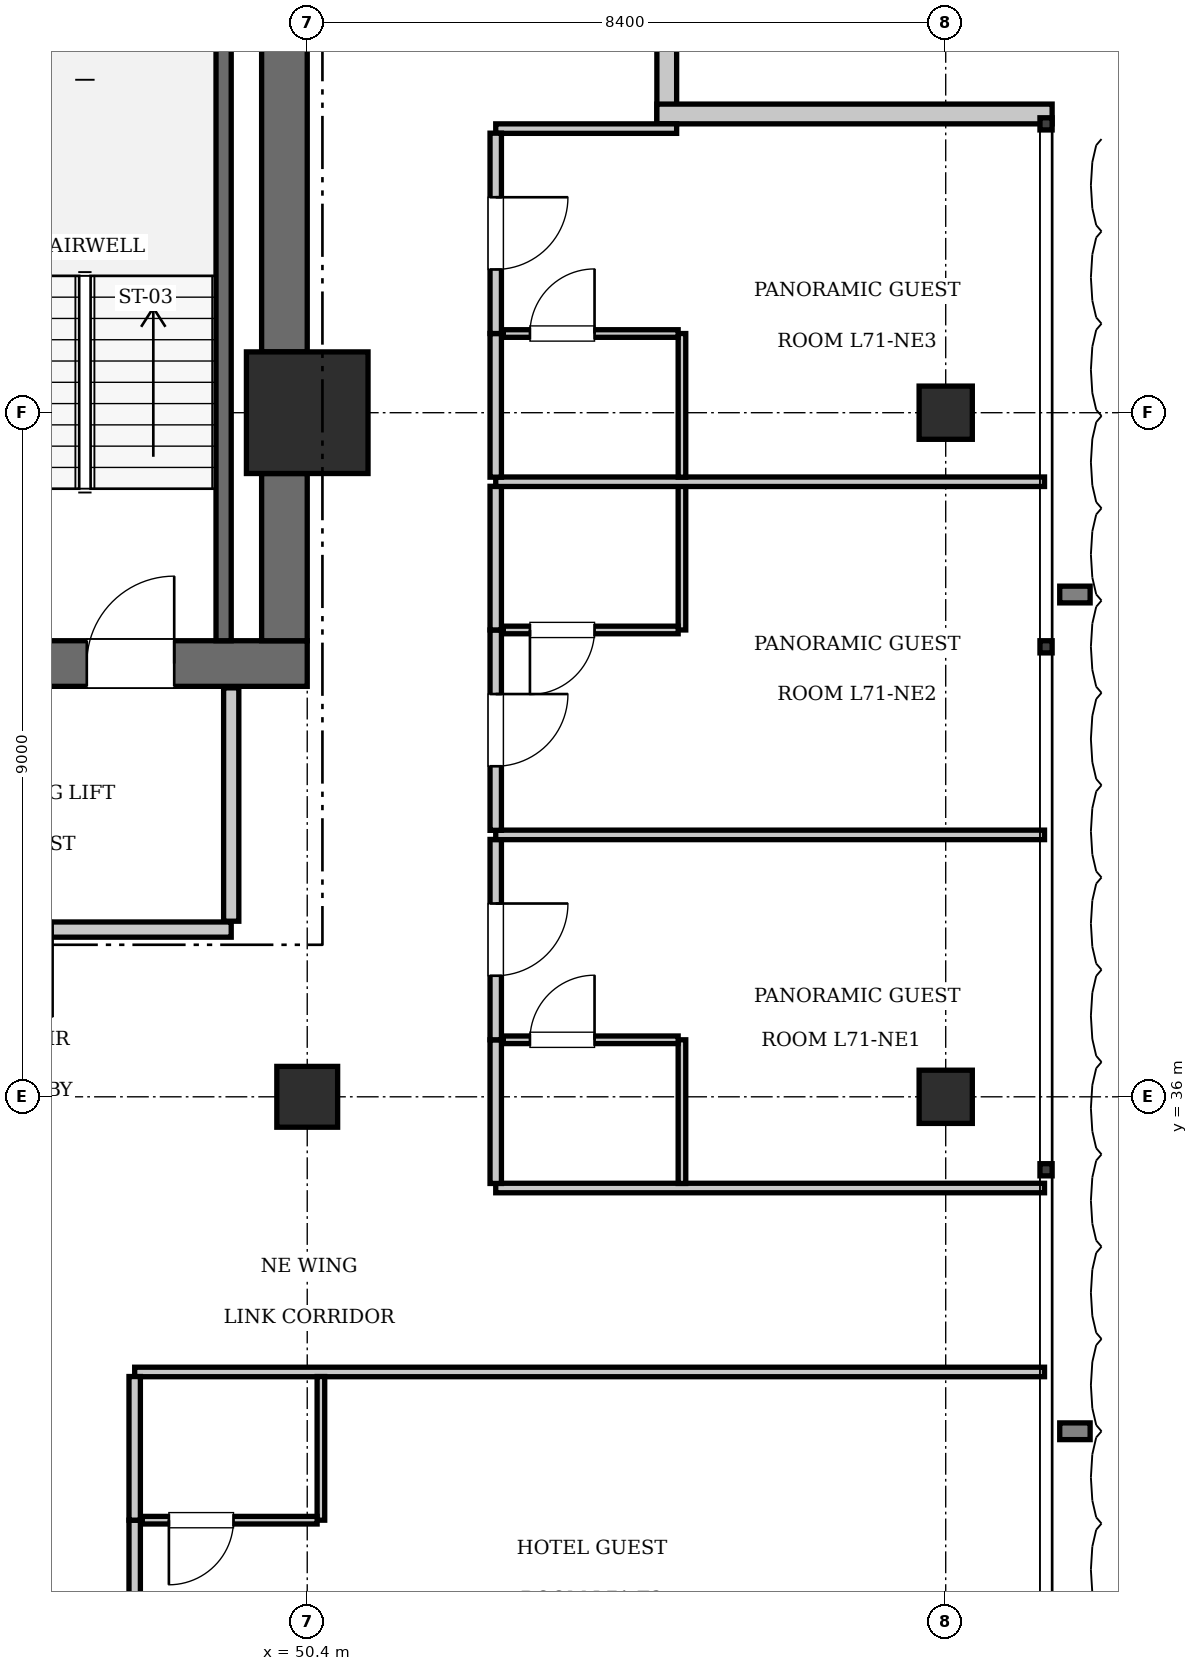
"""IFC4 building model, lengths in metres.
Left out: names, types, materials, properties, quantities, classifications, styles, units other than length and angle.
Written with IfcOpenShell. Run it as: python <this file> out.ifc"""

import sys

from ifc_helpers import new_model, si_unit, direction, frame, frame_2d, origin, origin_2d, place, context, subcontext, project, spatial, rectangle, extrude, element, fill, save


model = new_model("IFC4")
c1 = context("Model", 3, precision=1e-05, world=origin(), true_north=direction((0.0, 1.0)))
c2 = subcontext(c1, "Body", "Model", "MODEL_VIEW")
j1 = project(units=[si_unit("LENGTHUNIT", "METRE"), si_unit("PLANEANGLEUNIT", "RADIAN")], contexts=[c1])
p1 = place(None, origin())
s1 = spatial("IfcSite", under=j1, at=p1, CompositionType="ELEMENT")
p2 = place(p1, origin())
s2 = spatial("IfcBuilding", under=s1, at=p2, CompositionType="ELEMENT")
p3 = place(p2, frame((0.0, 0.0, 289.45)))
s3 = spatial("IfcBuildingStorey", under=s2, at=p3, CompositionType="ELEMENT", Elevation=289.45)
p4 = place(p3, frame((50.4, 45.0, 0.0), z_axis=(0.0, 0.0, 1.0), x_axis=(1.0, 0.0, 0.0)))
e1 = element("IfcColumn", 1, at=p4, inside=s3, PredefinedType="COLUMN", context=c2, shape_type="SweptSolid", body=[
    extrude(rectangle(XDim=1.6, YDim=1.6, at=origin_2d()), origin(), (0.0, 0.0, 1.0), 3.85),
])
p5 = place(p3, frame((43.6, 41.7, 0.0), z_axis=(0.0, 0.0, 1.0), x_axis=(1.0, 0.0, 0.0)))
e2 = element("IfcWall", 2, at=p5, inside=s3, PredefinedType="SHEAR", context=c2, shape_type="SweptSolid", body=[
    extrude(rectangle(XDim=6.8, YDim=0.6, at=frame_2d((3.4, 0.0))), origin(), (0.0, 0.0, 1.0), 3.85),
])
p6 = place(p5, frame((3.9, 0.0, 0.0)))
e3 = element("IfcOpeningElement", 3, at=p6, cuts=e2, PredefinedType="OPENING", context=c2, shape_type="SweptSolid", body=[
    extrude(rectangle(XDim=1.15, YDim=2.15, at=frame_2d((0.575, 1.075))), frame((0.0, 0.31, 0.0), z_axis=(0.0, -1.0, 0.0), x_axis=(1.0, 0.0, 0.0)), (0.0, 0.0, 1.0), 0.62),
])
p7 = place(p5, frame((0.55, 0.0, 0.0)))
e4 = element("IfcOpeningElement", 4, at=p7, cuts=e2, PredefinedType="OPENING", context=c2, shape_type="SweptSolid", body=[
    extrude(rectangle(XDim=1.1, YDim=2.2, at=frame_2d((0.55, 1.1))), frame((0.0, 0.31, 0.0), z_axis=(0.0, -1.0, 0.0), x_axis=(1.0, 0.0, 0.0)), (0.0, 0.0, 1.0), 0.62),
])
p8 = place(p3, frame((50.1, 42.0, 0.0), z_axis=(0.0, 0.0, 1.0), x_axis=(0.0, 1.0, 0.0)))
e5 = element("IfcWall", 5, at=p8, inside=s3, PredefinedType="SHEAR", context=c2, shape_type="SweptSolid", body=[
    extrude(rectangle(XDim=2.2, YDim=0.6, at=frame_2d((1.1, 0.0))), origin(), (0.0, 0.0, 1.0), 3.85),
])
p9 = place(p3, frame((50.1, 45.8, 0.0), z_axis=(0.0, 0.0, 1.0), x_axis=(0.0, 1.0, 0.0)))
e6 = element("IfcWall", 6, at=p9, inside=s3, PredefinedType="SHEAR", context=c2, shape_type="SweptSolid", body=[
    extrude(rectangle(XDim=7.6, YDim=0.6, at=frame_2d((3.8, 0.0))), origin(), (0.0, 0.0, 1.0), 3.85),
])
p10 = place(p3, frame((50.4, 36.0, 0.0), z_axis=(0.0, 0.0, 1.0), x_axis=(1.0, 0.0, 0.0)))
e7 = element("IfcColumn", 7, at=p10, inside=s3, PredefinedType="COLUMN", context=c2, shape_type="SweptSolid", body=[
    extrude(rectangle(XDim=0.8, YDim=0.8, at=origin_2d()), origin(), (0.0, 0.0, 1.0), 3.85),
])
for number, where, z_axis, x_axis in (
    (8, (58.8, 36.0, 0.0), (0.0, 0.0, 1.0), (1.0, 0.0, 0.0)),
    (9, (58.8, 45.0, 0.0), (0.0, 0.0, 1.0), (1.0, 0.0, 0.0)),
):
    element("IfcColumn", number, at=place(p3, frame(where, z_axis=z_axis, x_axis=x_axis)), inside=s3, PredefinedType="COLUMN", context=c2, shape_type="SweptSolid", body=[
        extrude(rectangle(XDim=0.7, YDim=0.7, at=origin_2d()), origin(), (0.0, 0.0, 1.0), 3.85),
    ])
p11 = place(p3, frame((49.3, 42.0, 0.0), z_axis=(0.0, 0.0, 1.0), x_axis=(0.0, 1.0, 0.0)))
e10 = element("IfcWall", 10, at=p11, inside=s3, PredefinedType="SOLIDWALL", context=c2, shape_type="SweptSolid", body=[
    extrude(rectangle(XDim=9.12, YDim=0.2, at=frame_2d((4.56, 0.0))), origin(), (0.0, 0.0, 1.0), 3.61),
])
for number, where, z_axis, x_axis in (
    (11, (55.13, 54.0, 0.0), (0.0, 0.0, 1.0), (0.0, -1.0, 0.0)),
    (12, (55.0, 48.93, 0.0), (0.0, 0.0, 1.0), (1.0, 0.0, 0.0)),
):
    element("IfcWall", number, at=place(p3, frame(where, z_axis=z_axis, x_axis=x_axis)), inside=s3, PredefinedType="SOLIDWALL", context=c2, shape_type="SweptSolid", body=[
        extrude(rectangle(XDim=5.2, YDim=0.26, at=frame_2d((2.6, 0.0))), origin(), (0.0, 0.0, 1.0), 3.61),
    ])
p12 = place(p3, frame((43.6, 38.2, 0.0), z_axis=(0.0, 0.0, 1.0), x_axis=(1.0, 0.0, 0.0)))
e13 = element("IfcWall", 13, at=p12, inside=s3, PredefinedType="PARTITIONING", context=c2, shape_type="SweptSolid", body=[
    extrude(rectangle(XDim=5.8, YDim=0.2, at=frame_2d((2.9, 0.0))), origin(), (0.0, 0.0, 1.0), 3.61),
])
p13 = place(p12, frame((2.3, 0.0, 0.0)))
e14 = element("IfcOpeningElement", 14, at=p13, cuts=e13, PredefinedType="OPENING", context=c2, shape_type="SweptSolid", body=[
    extrude(rectangle(XDim=1.15, YDim=2.15, at=frame_2d((0.575, 1.075))), frame((0.0, 0.11, 0.0), z_axis=(0.0, -1.0, 0.0), x_axis=(1.0, 0.0, 0.0)), (0.0, 0.0, 1.0), 0.22),
])
p14 = place(p3, frame((49.4, 38.31, 0.0), z_axis=(0.0, 0.0, 1.0), x_axis=(0.0, 1.0, 0.0)))
e15 = element("IfcWall", 15, at=p14, inside=s3, PredefinedType="PARTITIONING", context=c2, shape_type="SweptSolid", body=[
    extrude(rectangle(XDim=3.07, YDim=0.2, at=frame_2d((1.535, 0.0))), origin(), (0.0, 0.0, 1.0), 3.61),
])
p15 = place(p3, frame((48.13, 32.38, 0.0), z_axis=(0.0, 0.0, 1.0), x_axis=(1.0, 0.0, 0.0)))
e16 = element("IfcWall", 16, at=p15, inside=s3, PredefinedType="PARTITIONING", context=c2, shape_type="SweptSolid", body=[
    extrude(rectangle(XDim=11.97, YDim=0.125, at=frame_2d((5.985, 0.0))), origin(), (0.0, 0.0, 1.0), 3.61),
])
p16 = place(p3, frame((48.13, 27.4, 0.0), z_axis=(0.0, 0.0, 1.0), x_axis=(0.0, 1.0, 0.0)))
e17 = element("IfcWall", 17, at=p16, inside=s3, PredefinedType="PARTITIONING", context=c2, shape_type="SweptSolid", body=[
    extrude(rectangle(XDim=3.03, YDim=0.15, at=frame_2d((1.515, 0.0))), origin(), (0.0, 0.0, 1.0), 3.61),
])
p17 = place(p16, frame((1.04, 0.0, 0.0)))
e18 = element("IfcOpeningElement", 18, at=p17, cuts=e17, PredefinedType="OPENING", context=c2, shape_type="SweptSolid", body=[
    extrude(rectangle(XDim=0.95, YDim=2.15, at=frame_2d((0.475, 1.075))), frame((0.0, 0.085, 0.0), z_axis=(0.0, -1.0, 0.0), x_axis=(1.0, 0.0, 0.0)), (0.0, 0.0, 1.0), 0.17),
])
p18 = place(p3, frame((48.13, 30.43, 0.0), z_axis=(0.0, 0.0, 1.0), x_axis=(0.0, 1.0, 0.0)))
e19 = element("IfcWall", 19, at=p18, inside=s3, PredefinedType="PARTITIONING", context=c2, shape_type="SweptSolid", body=[
    extrude(rectangle(XDim=1.89, YDim=0.15, at=frame_2d((0.945, 0.0))), origin(), (0.0, 0.0, 1.0), 3.61),
])
p19 = place(p3, frame((50.58, 30.43, 0.0), z_axis=(0.0, 0.0, 1.0), x_axis=(0.0, 1.0, 0.0)))
e20 = element("IfcWall", 20, at=p19, inside=s3, PredefinedType="PARTITIONING", context=c2, shape_type="SweptSolid", body=[
    extrude(rectangle(XDim=1.89, YDim=0.1, at=frame_2d((0.945, 0.0))), origin(), (0.0, 0.0, 1.0), 3.61),
])
p20 = place(p3, frame((48.23, 30.43, 0.0), z_axis=(0.0, 0.0, 1.0), x_axis=(1.0, 0.0, 0.0)))
e21 = element("IfcWall", 21, at=p20, inside=s3, PredefinedType="PARTITIONING", context=c2, shape_type="SweptSolid", body=[
    extrude(rectangle(XDim=2.3, YDim=0.1, at=frame_2d((1.15, 0.0))), origin(), (0.0, 0.0, 1.0), 3.61),
])
p21 = place(p20, frame((0.35, 0.0, 0.0)))
e22 = element("IfcOpeningElement", 22, at=p21, cuts=e21, PredefinedType="OPENING", context=c2, shape_type="SweptSolid", body=[
    extrude(rectangle(XDim=0.85, YDim=2.1, at=frame_2d((0.425, 1.05))), frame((0.0, 0.06, 0.0), z_axis=(0.0, -1.0, 0.0), x_axis=(1.0, 0.0, 0.0)), (0.0, 0.0, 1.0), 0.12),
])
p22 = place(p3, frame((52.88, 34.8, 0.0), z_axis=(0.0, 0.0, 1.0), x_axis=(1.0, 0.0, 0.0)))
e23 = element("IfcWall", 23, at=p22, inside=s3, PredefinedType="PARTITIONING", context=c2, shape_type="SweptSolid", body=[
    extrude(rectangle(XDim=7.22, YDim=0.125, at=frame_2d((3.61, 0.0))), origin(), (0.0, 0.0, 1.0), 3.61),
])
p23 = place(p3, frame((52.88, 48.738, 0.0), z_axis=(0.0, 0.0, 1.0), x_axis=(1.0, 0.0, 0.0)))
e24 = element("IfcWall", 24, at=p23, inside=s3, PredefinedType="PARTITIONING", context=c2, shape_type="SweptSolid", body=[
    extrude(rectangle(XDim=2.38, YDim=0.125, at=frame_2d((1.19, 0.0))), origin(), (0.0, 0.0, 1.0), 3.61),
])
p24 = place(p3, frame((52.88, 34.86, 0.0), z_axis=(0.0, 0.0, 1.0), x_axis=(0.0, 1.0, 0.0)))
e25 = element("IfcWall", 25, at=p24, inside=s3, PredefinedType="PARTITIONING", context=c2, shape_type="SweptSolid", body=[
    extrude(rectangle(XDim=1.89, YDim=0.15, at=frame_2d((0.945, 0.0))), origin(), (0.0, 0.0, 1.0), 3.61),
])
p25 = place(p3, frame((52.88, 36.75, 0.0), z_axis=(0.0, 0.0, 1.0), x_axis=(0.0, 1.0, 0.0)))
e26 = element("IfcWall", 26, at=p25, inside=s3, PredefinedType="PARTITIONING", context=c2, shape_type="SweptSolid", body=[
    extrude(rectangle(XDim=2.636, YDim=0.15, at=frame_2d((1.318, 0.0))), origin(), (0.0, 0.0, 1.0), 3.61),
])
p26 = place(p25, frame((0.843, 0.0, 0.0)))
e27 = element("IfcOpeningElement", 27, at=p26, cuts=e26, PredefinedType="OPENING", context=c2, shape_type="SweptSolid", body=[
    extrude(rectangle(XDim=0.95, YDim=2.15, at=frame_2d((0.475, 1.075))), frame((0.0, 0.085, 0.0), z_axis=(0.0, -1.0, 0.0), x_axis=(1.0, 0.0, 0.0)), (0.0, 0.0, 1.0), 0.17),
])
p27 = place(p3, frame((55.33, 34.86, 0.0), z_axis=(0.0, 0.0, 1.0), x_axis=(0.0, 1.0, 0.0)))
e28 = element("IfcWall", 28, at=p27, inside=s3, PredefinedType="PARTITIONING", context=c2, shape_type="SweptSolid", body=[
    extrude(rectangle(XDim=1.89, YDim=0.1, at=frame_2d((0.945, 0.0))), origin(), (0.0, 0.0, 1.0), 3.61),
])
p28 = place(p3, frame((52.98, 36.75, 0.0), z_axis=(0.0, 0.0, 1.0), x_axis=(1.0, 0.0, 0.0)))
e29 = element("IfcWall", 29, at=p28, inside=s3, PredefinedType="PARTITIONING", context=c2, shape_type="SweptSolid", body=[
    extrude(rectangle(XDim=2.3, YDim=0.1, at=frame_2d((1.15, 0.0))), origin(), (0.0, 0.0, 1.0), 3.61),
])
p29 = place(p28, frame((0.35, 0.0, 0.0)))
e30 = element("IfcOpeningElement", 30, at=p29, cuts=e29, PredefinedType="OPENING", context=c2, shape_type="SweptSolid", body=[
    extrude(rectangle(XDim=0.85, YDim=2.1, at=frame_2d((0.425, 1.05))), frame((0.0, 0.06, 0.0), z_axis=(0.0, -1.0, 0.0), x_axis=(1.0, 0.0, 0.0)), (0.0, 0.0, 1.0), 0.12),
])
p30 = place(p3, frame((52.88, 39.446, 0.0), z_axis=(0.0, 0.0, 1.0), x_axis=(1.0, 0.0, 0.0)))
e31 = element("IfcWall", 31, at=p30, inside=s3, PredefinedType="PARTITIONING", context=c2, shape_type="SweptSolid", body=[
    extrude(rectangle(XDim=7.22, YDim=0.125, at=frame_2d((3.61, 0.0))), origin(), (0.0, 0.0, 1.0), 3.61),
])
p31 = place(p3, frame((52.88, 39.506, 0.0), z_axis=(0.0, 0.0, 1.0), x_axis=(0.0, 1.0, 0.0)))
e32 = element("IfcWall", 32, at=p31, inside=s3, PredefinedType="PARTITIONING", context=c2, shape_type="SweptSolid", body=[
    extrude(rectangle(XDim=2.636, YDim=0.15, at=frame_2d((1.318, 0.0))), origin(), (0.0, 0.0, 1.0), 3.61),
])
p32 = place(p31, frame((0.843, 0.0, 0.0)))
e33 = element("IfcOpeningElement", 33, at=p32, cuts=e32, PredefinedType="OPENING", context=c2, shape_type="SweptSolid", body=[
    extrude(rectangle(XDim=0.95, YDim=2.15, at=frame_2d((0.475, 1.075))), frame((0.0, 0.085, 0.0), z_axis=(0.0, -1.0, 0.0), x_axis=(1.0, 0.0, 0.0)), (0.0, 0.0, 1.0), 0.17),
])
p33 = place(p3, frame((52.88, 42.142, 0.0), z_axis=(0.0, 0.0, 1.0), x_axis=(0.0, 1.0, 0.0)))
e34 = element("IfcWall", 34, at=p33, inside=s3, PredefinedType="PARTITIONING", context=c2, shape_type="SweptSolid", body=[
    extrude(rectangle(XDim=1.89, YDim=0.15, at=frame_2d((0.945, 0.0))), origin(), (0.0, 0.0, 1.0), 3.61),
])
p34 = place(p3, frame((55.33, 42.142, 0.0), z_axis=(0.0, 0.0, 1.0), x_axis=(0.0, 1.0, 0.0)))
e35 = element("IfcWall", 35, at=p34, inside=s3, PredefinedType="PARTITIONING", context=c2, shape_type="SweptSolid", body=[
    extrude(rectangle(XDim=1.89, YDim=0.1, at=frame_2d((0.945, 0.0))), origin(), (0.0, 0.0, 1.0), 3.61),
])
p35 = place(p3, frame((52.98, 42.142, 0.0), z_axis=(0.0, 0.0, 1.0), x_axis=(1.0, 0.0, 0.0)))
e36 = element("IfcWall", 36, at=p35, inside=s3, PredefinedType="PARTITIONING", context=c2, shape_type="SweptSolid", body=[
    extrude(rectangle(XDim=2.3, YDim=0.1, at=frame_2d((1.15, 0.0))), origin(), (0.0, 0.0, 1.0), 3.61),
])
p36 = place(p35, frame((0.35, 0.0, 0.0)))
e37 = element("IfcOpeningElement", 37, at=p36, cuts=e36, PredefinedType="OPENING", context=c2, shape_type="SweptSolid", body=[
    extrude(rectangle(XDim=0.85, YDim=2.1, at=frame_2d((0.425, 1.05))), frame((0.0, 0.06, 0.0), z_axis=(0.0, -1.0, 0.0), x_axis=(1.0, 0.0, 0.0)), (0.0, 0.0, 1.0), 0.12),
])
p37 = place(p3, frame((52.88, 44.092, 0.0), z_axis=(0.0, 0.0, 1.0), x_axis=(1.0, 0.0, 0.0)))
e38 = element("IfcWall", 38, at=p37, inside=s3, PredefinedType="PARTITIONING", context=c2, shape_type="SweptSolid", body=[
    extrude(rectangle(XDim=7.22, YDim=0.125, at=frame_2d((3.61, 0.0))), origin(), (0.0, 0.0, 1.0), 3.61),
])
p38 = place(p3, frame((52.88, 44.152, 0.0), z_axis=(0.0, 0.0, 1.0), x_axis=(0.0, 1.0, 0.0)))
e39 = element("IfcWall", 39, at=p38, inside=s3, PredefinedType="PARTITIONING", context=c2, shape_type="SweptSolid", body=[
    extrude(rectangle(XDim=1.89, YDim=0.15, at=frame_2d((0.945, 0.0))), origin(), (0.0, 0.0, 1.0), 3.61),
])
p39 = place(p3, frame((52.88, 46.042, 0.0), z_axis=(0.0, 0.0, 1.0), x_axis=(0.0, 1.0, 0.0)))
e40 = element("IfcWall", 40, at=p39, inside=s3, PredefinedType="PARTITIONING", context=c2, shape_type="SweptSolid", body=[
    extrude(rectangle(XDim=2.636, YDim=0.15, at=frame_2d((1.318, 0.0))), origin(), (0.0, 0.0, 1.0), 3.61),
])
p40 = place(p39, frame((0.843, 0.0, 0.0)))
e41 = element("IfcOpeningElement", 41, at=p40, cuts=e40, PredefinedType="OPENING", context=c2, shape_type="SweptSolid", body=[
    extrude(rectangle(XDim=0.95, YDim=2.15, at=frame_2d((0.475, 1.075))), frame((0.0, 0.085, 0.0), z_axis=(0.0, -1.0, 0.0), x_axis=(1.0, 0.0, 0.0)), (0.0, 0.0, 1.0), 0.17),
])
p41 = place(p3, frame((55.33, 44.152, 0.0), z_axis=(0.0, 0.0, 1.0), x_axis=(0.0, 1.0, 0.0)))
e42 = element("IfcWall", 42, at=p41, inside=s3, PredefinedType="PARTITIONING", context=c2, shape_type="SweptSolid", body=[
    extrude(rectangle(XDim=1.89, YDim=0.1, at=frame_2d((0.945, 0.0))), origin(), (0.0, 0.0, 1.0), 3.61),
])
p42 = place(p3, frame((52.98, 46.042, 0.0), z_axis=(0.0, 0.0, 1.0), x_axis=(1.0, 0.0, 0.0)))
e43 = element("IfcWall", 43, at=p42, inside=s3, PredefinedType="PARTITIONING", context=c2, shape_type="SweptSolid", body=[
    extrude(rectangle(XDim=2.3, YDim=0.1, at=frame_2d((1.15, 0.0))), origin(), (0.0, 0.0, 1.0), 3.61),
])
p43 = place(p42, frame((0.35, 0.0, 0.0)))
e44 = element("IfcOpeningElement", 44, at=p43, cuts=e43, PredefinedType="OPENING", context=c2, shape_type="SweptSolid", body=[
    extrude(rectangle(XDim=0.85, YDim=2.1, at=frame_2d((0.425, 1.05))), frame((0.0, 0.06, 0.0), z_axis=(0.0, -1.0, 0.0), x_axis=(1.0, 0.0, 0.0)), (0.0, 0.0, 1.0), 0.12),
])
p44 = place(p6, origin())
e45 = element("IfcDoor", 45, at=p44, inside=s3, OperationType="SINGLE_SWING_RIGHT", PredefinedType="DOOR", context=c2, shape_type="SweptSolid", body=[
    extrude(rectangle(XDim=1.15, YDim=2.15, at=frame_2d((0.575, 1.075))), frame((0.0, 0.025, 0.0), z_axis=(0.0, -1.0, 0.0), x_axis=(1.0, 0.0, 0.0)), (0.0, 0.0, 1.0), 0.05),
])
fill(e3, e45)
p45 = place(p21, frame((0.85, 0.0, 0.0), z_axis=(0.0, 0.0, 1.0), x_axis=(-1.0, 0.0, 0.0)))
e46 = element("IfcDoor", 46, at=p45, inside=s3, OperationType="SINGLE_SWING_RIGHT", PredefinedType="DOOR", context=c2, shape_type="SweptSolid", body=[
    extrude(rectangle(XDim=0.85, YDim=2.1, at=frame_2d((0.425, 1.05))), frame((0.0, 0.025, 0.0), z_axis=(0.0, -1.0, 0.0), x_axis=(1.0, 0.0, 0.0)), (0.0, 0.0, 1.0), 0.05),
])
fill(e22, e46)
p46 = place(p29, origin())
e47 = element("IfcDoor", 47, at=p46, inside=s3, OperationType="SINGLE_SWING_RIGHT", PredefinedType="DOOR", context=c2, shape_type="SweptSolid", body=[
    extrude(rectangle(XDim=0.85, YDim=2.1, at=frame_2d((0.425, 1.05))), frame((0.0, 0.025, 0.0), z_axis=(0.0, -1.0, 0.0), x_axis=(1.0, 0.0, 0.0)), (0.0, 0.0, 1.0), 0.05),
])
fill(e30, e47)
p47 = place(p26, frame((0.95, 0.0, 0.0), z_axis=(0.0, 0.0, 1.0), x_axis=(-1.0, 0.0, 0.0)))
e48 = element("IfcDoor", 48, at=p47, inside=s3, OperationType="SINGLE_SWING_LEFT", PredefinedType="DOOR", context=c2, shape_type="SweptSolid", body=[
    extrude(rectangle(XDim=0.95, YDim=2.15, at=frame_2d((0.475, 1.075))), frame((0.0, 0.025, 0.0), z_axis=(0.0, -1.0, 0.0), x_axis=(1.0, 0.0, 0.0)), (0.0, 0.0, 1.0), 0.05),
])
fill(e27, e48)
p48 = place(p36, frame((0.85, 0.0, 0.0), z_axis=(0.0, 0.0, 1.0), x_axis=(-1.0, 0.0, 0.0)))
e49 = element("IfcDoor", 49, at=p48, inside=s3, OperationType="SINGLE_SWING_RIGHT", PredefinedType="DOOR", context=c2, shape_type="SweptSolid", body=[
    extrude(rectangle(XDim=0.85, YDim=2.1, at=frame_2d((0.425, 1.05))), frame((0.0, 0.025, 0.0), z_axis=(0.0, -1.0, 0.0), x_axis=(1.0, 0.0, 0.0)), (0.0, 0.0, 1.0), 0.05),
])
fill(e37, e49)
p49 = place(p32, frame((0.95, 0.0, 0.0), z_axis=(0.0, 0.0, 1.0), x_axis=(-1.0, 0.0, 0.0)))
e50 = element("IfcDoor", 50, at=p49, inside=s3, OperationType="SINGLE_SWING_LEFT", PredefinedType="DOOR", context=c2, shape_type="SweptSolid", body=[
    extrude(rectangle(XDim=0.95, YDim=2.15, at=frame_2d((0.475, 1.075))), frame((0.0, 0.025, 0.0), z_axis=(0.0, -1.0, 0.0), x_axis=(1.0, 0.0, 0.0)), (0.0, 0.0, 1.0), 0.05),
])
fill(e33, e50)
p50 = place(p43, origin())
e51 = element("IfcDoor", 51, at=p50, inside=s3, OperationType="SINGLE_SWING_RIGHT", PredefinedType="DOOR", context=c2, shape_type="SweptSolid", body=[
    extrude(rectangle(XDim=0.85, YDim=2.1, at=frame_2d((0.425, 1.05))), frame((0.0, 0.025, 0.0), z_axis=(0.0, -1.0, 0.0), x_axis=(1.0, 0.0, 0.0)), (0.0, 0.0, 1.0), 0.05),
])
fill(e44, e51)
p51 = place(p40, frame((0.95, 0.0, 0.0), z_axis=(0.0, 0.0, 1.0), x_axis=(-1.0, 0.0, 0.0)))
e52 = element("IfcDoor", 52, at=p51, inside=s3, OperationType="SINGLE_SWING_LEFT", PredefinedType="DOOR", context=c2, shape_type="SweptSolid", body=[
    extrude(rectangle(XDim=0.95, YDim=2.15, at=frame_2d((0.475, 1.075))), frame((0.0, 0.025, 0.0), z_axis=(0.0, -1.0, 0.0), x_axis=(1.0, 0.0, 0.0)), (0.0, 0.0, 1.0), 0.05),
])
fill(e41, e52)
save(model, sys.argv[1])
